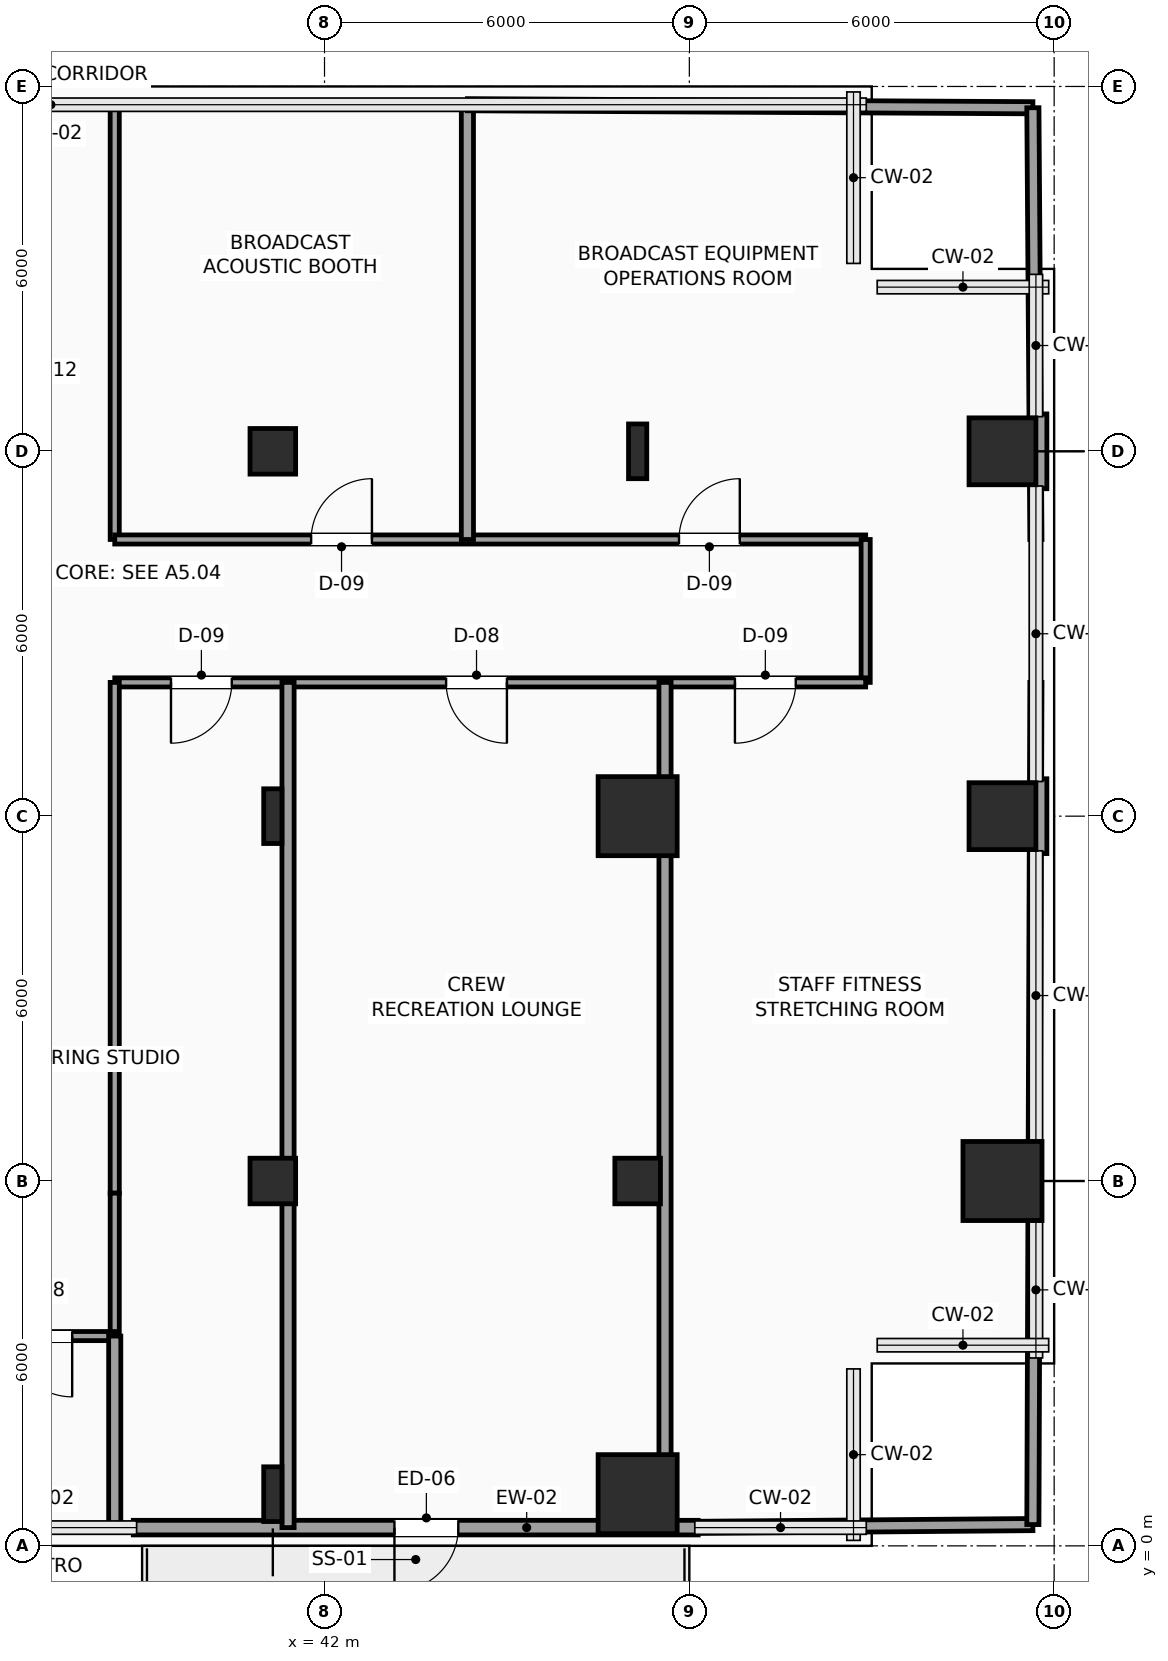
"""IFC4 building model, lengths in metres.
Left out: names, types, materials, properties, quantities, classifications, styles, units other than length and angle.
Written with IfcOpenShell. Run it as: python <this file> out.ifc"""

import sys

from ifc_helpers import new_model, si_unit, direction, frame, frame_2d, origin, origin_2d, place, context, subcontext, project, spatial, rectangle, hollow_rectangle, i_section, extrude, element, fill, save


model = new_model("IFC4")
c1 = context("Model", 3, precision=1e-05, world=origin(), true_north=direction((0.0, 1.0)))
c2 = subcontext(c1, "Body", "Model", "MODEL_VIEW")
j1 = project(units=[si_unit("LENGTHUNIT", "METRE"), si_unit("PLANEANGLEUNIT", "RADIAN")], contexts=[c1])
p1 = place(None, origin())
s1 = spatial("IfcSite", under=j1, at=p1, CompositionType="ELEMENT")
p2 = place(p1, origin())
s2 = spatial("IfcBuilding", under=s1, at=p2, CompositionType="ELEMENT")
p3 = place(p2, frame((0.0, 0.0, 71.4)))
s3 = spatial("IfcBuildingStorey", under=s2, at=p3, CompositionType="ELEMENT", Elevation=71.4)
p4 = place(p3, frame((41.15, 0.85, 0.0), z_axis=(0.0, 0.0, 1.0), x_axis=(1.0, 0.0, 0.0)))
e1 = element("IfcColumn", 1, at=p4, inside=s3, PredefinedType="COLUMN", context=c2, shape_type="SweptSolid", body=[
    extrude(i_section(OverallWidth=0.3, OverallDepth=0.9, WebThickness=0.019, FlangeThickness=0.035, FilletRadius=0.03, at=origin_2d()), origin(), (0.0, 0.0, 1.0), 3.9),
])
p5 = place(p3, frame((41.15, 6.0, 0.0), z_axis=(0.0, 0.0, 1.0), x_axis=(1.0, 0.0, 0.0)))
e2 = element("IfcColumn", 2, at=p5, inside=s3, PredefinedType="COLUMN", context=c2, shape_type="SweptSolid", body=[
    extrude(hollow_rectangle(XDim=0.75, YDim=0.75, WallThickness=0.035, InnerFilletRadius=0.035, OuterFilletRadius=0.05, at=origin_2d()), origin(), (0.0, 0.0, 1.0), 3.9),
])
p6 = place(p3, frame((41.15, 12.0, 0.0), z_axis=(0.0, 0.0, 1.0), x_axis=(1.0, 0.0, 0.0)))
e3 = element("IfcColumn", 3, at=p6, inside=s3, PredefinedType="COLUMN", context=c2, shape_type="SweptSolid", body=[
    extrude(i_section(OverallWidth=0.3, OverallDepth=0.9, WebThickness=0.019, FlangeThickness=0.035, FilletRadius=0.03, at=origin_2d()), origin(), (0.0, 0.0, 1.0), 3.9),
])
p7 = place(p3, frame((41.15, 18.0, 0.0), z_axis=(0.0, 0.0, 1.0), x_axis=(1.0, 0.0, 0.0)))
e4 = element("IfcColumn", 4, at=p7, inside=s3, PredefinedType="COLUMN", context=c2, shape_type="SweptSolid", body=[
    extrude(hollow_rectangle(XDim=0.75, YDim=0.75, WallThickness=0.035, InnerFilletRadius=0.035, OuterFilletRadius=0.05, at=origin_2d()), origin(), (0.0, 0.0, 1.0), 3.9),
])
p8 = place(p3, frame((47.15, 0.85, 0.0), z_axis=(0.0, 0.0, 1.0), x_axis=(1.0, 0.0, 0.0)))
e5 = element("IfcColumn", 5, at=p8, inside=s3, PredefinedType="COLUMN", context=c2, shape_type="SweptSolid", body=[
    extrude(rectangle(XDim=1.3, YDim=1.3, at=origin_2d()), origin(), (0.0, 0.0, 1.0), 3.9),
])
p9 = place(p3, frame((47.15, 6.0, 0.0), z_axis=(0.0, 0.0, 1.0), x_axis=(1.0, 0.0, 0.0)))
e6 = element("IfcColumn", 6, at=p9, inside=s3, PredefinedType="COLUMN", context=c2, shape_type="SweptSolid", body=[
    extrude(hollow_rectangle(XDim=0.75, YDim=0.75, WallThickness=0.035, InnerFilletRadius=0.035, OuterFilletRadius=0.05, at=origin_2d()), origin(), (0.0, 0.0, 1.0), 3.9),
])
p10 = place(p3, frame((47.15, 12.0, 0.0), z_axis=(0.0, 0.0, 1.0), x_axis=(1.0, 0.0, 0.0)))
e7 = element("IfcColumn", 7, at=p10, inside=s3, PredefinedType="COLUMN", context=c2, shape_type="SweptSolid", body=[
    extrude(rectangle(XDim=1.3, YDim=1.3, at=origin_2d()), origin(), (0.0, 0.0, 1.0), 3.9),
])
p11 = place(p3, frame((47.15, 18.0, 0.0), z_axis=(0.0, 0.0, 1.0), x_axis=(1.0, 0.0, 0.0)))
e8 = element("IfcColumn", 8, at=p11, inside=s3, PredefinedType="COLUMN", context=c2, shape_type="SweptSolid", body=[
    extrude(i_section(OverallWidth=0.3, OverallDepth=0.9, WebThickness=0.019, FlangeThickness=0.035, FilletRadius=0.03, at=origin_2d()), origin(), (0.0, 0.0, 1.0), 3.9),
])
p12 = place(p3, frame((53.15, 6.0, 0.0), z_axis=(0.0, 0.0, 1.0), x_axis=(1.0, 0.0, 0.0)))
e9 = element("IfcColumn", 9, at=p12, inside=s3, PredefinedType="COLUMN", context=c2, shape_type="SweptSolid", body=[
    extrude(rectangle(XDim=1.3, YDim=1.3, at=origin_2d()), origin(), (0.0, 0.0, 1.0), 3.9),
])
for number, where, z_axis, x_axis in (
    (10, (53.15, 12.0, 0.0), (0.0, 0.0, 1.0), (1.0, 0.0, 0.0)),
    (11, (53.15, 18.0, 0.0), (0.0, 0.0, 1.0), (1.0, 0.0, 0.0)),
):
    element("IfcColumn", number, at=place(p3, frame(where, z_axis=z_axis, x_axis=x_axis)), inside=s3, PredefinedType="COLUMN", context=c2, shape_type="SweptSolid", body=[
        extrude(rectangle(XDim=1.1, YDim=1.1, at=origin_2d()), origin(), (0.0, 0.0, 1.0), 3.9),
    ])
p13 = place(p3, frame((48.145, 0.3, 0.0), z_axis=(0.0, 0.0, 1.0), x_axis=(-1.0, 0.0, 0.0)))
e12 = element("IfcWall", 12, at=p13, inside=s3, PredefinedType="SOLIDWALL", context=c2, shape_type="SweptSolid", body=[
    extrude(rectangle(XDim=9.29, YDim=0.24, at=frame_2d((4.645, 0.0))), origin(), (0.0, 0.0, 1.0), 3.65),
])
p14 = place(p13, frame((3.945, 0.0, 0.0)))
e13 = element("IfcOpeningElement", 13, at=p14, cuts=e12, PredefinedType="OPENING", context=c2, shape_type="SweptSolid", body=[
    extrude(rectangle(XDim=1.05, YDim=2.2, at=frame_2d((0.525, 1.1))), frame((0.0, 0.13, 0.0), z_axis=(0.0, -1.0, 0.0), x_axis=(1.0, 0.0, 0.0)), (0.0, 0.0, 1.0), 0.26),
])
for number, where, z_axis, x_axis in (
    (14, (53.76, 18.615, 0.0), (0.0, 0.0, 1.0), (0.0, -1.0, 0.0)),
    (15, (53.76, 12.615, 0.0), (0.0, 0.0, 1.0), (0.0, -1.0, 0.0)),
):
    element("IfcWall", number, at=place(p3, frame(where, z_axis=z_axis, x_axis=x_axis)), inside=s3, PredefinedType="SOLIDWALL", context=c2, shape_type="SweptSolid", body=[
        extrude(rectangle(XDim=1.23, YDim=0.24, at=frame_2d((0.615, 0.0))), origin(), (0.0, 0.0, 1.0), 3.65),
    ])
p15 = place(p3, frame((38.55, 23.7, 0.0), z_axis=(0.0, 0.0, 1.0), x_axis=(0.0, -1.0, 0.0)))
e16 = element("IfcWall", 16, at=p15, inside=s3, PredefinedType="PARTITIONING", context=c2, shape_type="SweptSolid", body=[
    extrude(rectangle(XDim=7.15, YDim=0.15, at=frame_2d((3.575, 0.0))), origin(), (0.0, 0.0, 1.0), 3.65),
])
p16 = place(p3, frame((38.55, 16.55, 0.0), z_axis=(0.0, 0.0, 1.0), x_axis=(1.0, 0.0, 0.0)))
e17 = element("IfcWall", 17, at=p16, inside=s3, PredefinedType="PARTITIONING", context=c2, shape_type="SweptSolid", body=[
    extrude(rectangle(XDim=12.35, YDim=0.15, at=frame_2d((6.175, 0.0))), origin(), (0.0, 0.0, 1.0), 3.65),
])
p17 = place(p16, frame((3.23, 0.0, 0.0)))
e18 = element("IfcOpeningElement", 18, at=p17, cuts=e17, PredefinedType="OPENING", context=c2, shape_type="SweptSolid", body=[
    extrude(rectangle(XDim=1.0, YDim=2.2, at=frame_2d((0.5, 1.1))), frame((0.0, 0.085, 0.0), z_axis=(0.0, -1.0, 0.0), x_axis=(1.0, 0.0, 0.0)), (0.0, 0.0, 1.0), 0.17),
])
p18 = place(p16, frame((9.28, 0.0, 0.0)))
e19 = element("IfcOpeningElement", 19, at=p18, cuts=e17, PredefinedType="OPENING", context=c2, shape_type="SweptSolid", body=[
    extrude(rectangle(XDim=1.0, YDim=2.2, at=frame_2d((0.5, 1.1))), frame((0.0, 0.085, 0.0), z_axis=(0.0, -1.0, 0.0), x_axis=(1.0, 0.0, 0.0)), (0.0, 0.0, 1.0), 0.17),
])
p19 = place(p3, frame((50.9, 16.55, 0.0), z_axis=(0.0, 0.0, 1.0), x_axis=(0.0, -1.0, 0.0)))
e20 = element("IfcWall", 20, at=p19, inside=s3, PredefinedType="PARTITIONING", context=c2, shape_type="SweptSolid", body=[
    extrude(rectangle(XDim=2.35, YDim=0.15, at=frame_2d((1.175, 0.0))), origin(), (0.0, 0.0, 1.0), 3.65),
])
p20 = place(p3, frame((50.9, 14.2, 0.0), z_axis=(0.0, 0.0, 1.0), x_axis=(-1.0, 0.0, 0.0)))
e21 = element("IfcWall", 21, at=p20, inside=s3, PredefinedType="PARTITIONING", context=c2, shape_type="SweptSolid", body=[
    extrude(rectangle(XDim=12.35, YDim=0.15, at=frame_2d((6.175, 0.0))), origin(), (0.0, 0.0, 1.0), 3.65),
])
p21 = place(p20, frame((10.425, 0.0, 0.0)))
e22 = element("IfcOpeningElement", 22, at=p21, cuts=e21, PredefinedType="OPENING", context=c2, shape_type="SweptSolid", body=[
    extrude(rectangle(XDim=1.0, YDim=2.2, at=frame_2d((0.5, 1.1))), frame((0.0, 0.085, 0.0), z_axis=(0.0, -1.0, 0.0), x_axis=(1.0, 0.0, 0.0)), (0.0, 0.0, 1.0), 0.17),
])
p22 = place(p20, frame((5.9, 0.0, 0.0)))
e23 = element("IfcOpeningElement", 23, at=p22, cuts=e21, PredefinedType="OPENING", context=c2, shape_type="SweptSolid", body=[
    extrude(rectangle(XDim=1.0, YDim=2.2, at=frame_2d((0.5, 1.1))), frame((0.0, 0.085, 0.0), z_axis=(0.0, -1.0, 0.0), x_axis=(1.0, 0.0, 0.0)), (0.0, 0.0, 1.0), 0.17),
])
p23 = place(p20, frame((1.15, 0.0, 0.0)))
e24 = element("IfcOpeningElement", 24, at=p23, cuts=e21, PredefinedType="OPENING", context=c2, shape_type="SweptSolid", body=[
    extrude(rectangle(XDim=1.0, YDim=2.2, at=frame_2d((0.5, 1.1))), frame((0.0, 0.085, 0.0), z_axis=(0.0, -1.0, 0.0), x_axis=(1.0, 0.0, 0.0)), (0.0, 0.0, 1.0), 0.17),
])
p24 = place(p3, frame((38.55, 14.2, 0.0), z_axis=(0.0, 0.0, 1.0), x_axis=(0.0, -1.0, 0.0)))
e25 = element("IfcWall", 25, at=p24, inside=s3, PredefinedType="PARTITIONING", context=c2, shape_type="SweptSolid", body=[
    extrude(rectangle(XDim=8.4, YDim=0.15, at=frame_2d((4.2, 0.0))), origin(), (0.0, 0.0, 1.0), 3.65),
])
p25 = place(p3, frame((38.55, 5.8, 0.0), z_axis=(0.0, 0.0, 1.0), x_axis=(0.0, -1.0, 0.0)))
e26 = element("IfcWall", 26, at=p25, inside=s3, PredefinedType="PARTITIONING", context=c2, shape_type="SweptSolid", body=[
    extrude(rectangle(XDim=2.35, YDim=0.15, at=frame_2d((1.175, 0.0))), origin(), (0.0, 0.0, 1.0), 3.65),
])
p26 = place(p3, frame((38.55, 3.45, 0.0), z_axis=(0.0, 0.0, 1.0), x_axis=(-1.0, 0.0, 0.0)))
e27 = element("IfcWall", 27, at=p26, inside=s3, PredefinedType="PARTITIONING", context=c2, shape_type="SweptSolid", body=[
    extrude(rectangle(XDim=2.4, YDim=0.15, at=frame_2d((1.2, 0.0))), origin(), (0.0, 0.0, 1.0), 3.142),
])
p27 = place(p26, frame((0.7, 0.0, 0.0)))
e28 = element("IfcOpeningElement", 28, at=p27, cuts=e27, PredefinedType="OPENING", context=c2, shape_type="SweptSolid", body=[
    extrude(rectangle(XDim=1.0, YDim=2.2, at=frame_2d((0.5, 1.1))), frame((0.0, 0.085, 0.0), z_axis=(0.0, -1.0, 0.0), x_axis=(1.0, 0.0, 0.0)), (0.0, 0.0, 1.0), 0.17),
])
p28 = place(p3, frame((41.4, 0.3, 0.0), z_axis=(0.0, 0.0, 1.0), x_axis=(0.0, 1.0, 0.0)))
e29 = element("IfcWall", 29, at=p28, inside=s3, PredefinedType="PARTITIONING", context=c2, shape_type="SweptSolid", body=[
    extrude(rectangle(XDim=13.9, YDim=0.2, at=frame_2d((6.95, 0.0))), origin(), (0.0, 0.0, 1.0), 2.992),
])
p29 = place(p3, frame((47.6, 0.3, 0.0), z_axis=(0.0, 0.0, 1.0), x_axis=(0.0, 1.0, 0.0)))
e30 = element("IfcWall", 30, at=p29, inside=s3, PredefinedType="PARTITIONING", context=c2, shape_type="SweptSolid", body=[
    extrude(rectangle(XDim=13.9, YDim=0.2, at=frame_2d((6.95, 0.0))), origin(), (0.0, 0.0, 1.0), 3.65),
])
p30 = place(p3, frame((48.145, 0.304, 0.0), z_axis=(0.0, 0.0, 1.0), x_axis=(0.999965611379, 0.008293133286, 0.0)))
e31 = element("IfcWall", 31, at=p30, inside=s3, PredefinedType="PARTITIONING", context=c2, shape_type="SweptSolid", body=[
    extrude(rectangle(XDim=5.505, YDim=0.2, at=frame_2d((2.752, 0.0))), origin(), (0.0, 0.0, 1.0), 3.65),
])
p31 = place(p3, frame((53.65, 0.35, 0.0), z_axis=(0.0, 0.0, 1.0), x_axis=(0.003606251025, 0.999993497456, 0.0)))
e32 = element("IfcWall", 32, at=p31, inside=s3, PredefinedType="PARTITIONING", context=c2, shape_type="SweptSolid", body=[
    extrude(rectangle(XDim=11.035, YDim=0.2, at=frame_2d((5.518, 0.0))), origin(), (0.0, 0.0, 1.0), 3.65),
])
p32 = place(p3, frame((53.694, 12.615, 0.0), z_axis=(0.0, 0.0, 1.0), x_axis=(0.003542799701, 0.999993724265, 0.0)))
e33 = element("IfcWall", 33, at=p32, inside=s3, PredefinedType="PARTITIONING", context=c2, shape_type="SweptSolid", body=[
    extrude(rectangle(XDim=1.585, YDim=0.2, at=frame_2d((0.792, 0.0))), origin(), (0.0, 0.0, 1.0), 3.65),
])
p33 = place(p3, frame((44.35, 16.55, 0.0), z_axis=(0.0, 0.0, 1.0), x_axis=(0.0, 1.0, 0.0)))
e34 = element("IfcWall", 34, at=p33, inside=s3, PredefinedType="PARTITIONING", context=c2, shape_type="SweptSolid", body=[
    extrude(rectangle(XDim=7.15, YDim=0.2, at=frame_2d((3.575, 0.0))), origin(), (0.0, 0.0, 1.0), 3.65),
])
p34 = place(p3, frame((44.35, 23.7, 0.0), z_axis=(0.0, 0.0, 1.0), x_axis=(0.999985518927, -0.005381629512, 0.0)))
e35 = element("IfcWall", 35, at=p34, inside=s3, PredefinedType="PARTITIONING", context=c2, shape_type="SweptSolid", body=[
    extrude(rectangle(XDim=9.3, YDim=0.2, at=frame_2d((4.65, 0.0))), origin(), (0.0, 0.0, 1.0), 3.65),
])
p35 = place(p3, frame((53.7, 16.55, 0.0), z_axis=(0.0, 0.0, 1.0), x_axis=(-0.007017371073, 0.999975377948, 0.0)))
e36 = element("IfcWall", 36, at=p35, inside=s3, PredefinedType="PARTITIONING", context=c2, shape_type="SweptSolid", body=[
    extrude(rectangle(XDim=0.835, YDim=0.2, at=frame_2d((0.417, 0.0))), origin(), (0.0, 0.0, 1.0), 3.65),
])
p36 = place(p3, frame((53.686, 18.615, 0.0), z_axis=(0.0, 0.0, 1.0), x_axis=(-0.007079296972, 0.999974941463, 0.0)))
e37 = element("IfcWall", 37, at=p36, inside=s3, PredefinedType="PARTITIONING", context=c2, shape_type="SweptSolid", body=[
    extrude(rectangle(XDim=5.035, YDim=0.2, at=frame_2d((2.518, 0.0))), origin(), (0.0, 0.0, 1.0), 3.65),
])
p37 = place(p3, frame((38.55, 0.3, 0.0), z_axis=(0.0, 0.0, 1.0), x_axis=(0.0, 1.0, 0.0)))
e38 = element("IfcWall", 38, at=p37, inside=s3, PredefinedType="PARTITIONING", context=c2, shape_type="SweptSolid", body=[
    extrude(rectangle(XDim=3.15, YDim=0.2, at=frame_2d((1.575, 0.0))), origin(), (0.0, 0.0, 1.0), 3.65),
])
p38 = place(p14, origin())
e39 = element("IfcDoor", 39, at=p38, inside=s3, OperationType="SINGLE_SWING_RIGHT", PredefinedType="DOOR", context=c2, shape_type="SweptSolid", body=[
    extrude(rectangle(XDim=1.05, YDim=2.2, at=frame_2d((0.525, 1.1))), frame((0.0, 0.025, 0.0), z_axis=(0.0, -1.0, 0.0), x_axis=(1.0, 0.0, 0.0)), (0.0, 0.0, 1.0), 0.05),
])
fill(e13, e39)
p39 = place(p17, origin())
e40 = element("IfcDoor", 40, at=p39, inside=s3, OperationType="SINGLE_SWING_RIGHT", PredefinedType="DOOR", context=c2, shape_type="SweptSolid", body=[
    extrude(rectangle(XDim=1.0, YDim=2.2, at=frame_2d((0.5, 1.1))), frame((0.0, 0.025, 0.0), z_axis=(0.0, -1.0, 0.0), x_axis=(1.0, 0.0, 0.0)), (0.0, 0.0, 1.0), 0.05),
])
fill(e18, e40)
p40 = place(p18, origin())
e41 = element("IfcDoor", 41, at=p40, inside=s3, OperationType="SINGLE_SWING_RIGHT", PredefinedType="DOOR", context=c2, shape_type="SweptSolid", body=[
    extrude(rectangle(XDim=1.0, YDim=2.2, at=frame_2d((0.5, 1.1))), frame((0.0, 0.025, 0.0), z_axis=(0.0, -1.0, 0.0), x_axis=(1.0, 0.0, 0.0)), (0.0, 0.0, 1.0), 0.05),
])
fill(e19, e41)
p41 = place(p21, origin())
e42 = element("IfcDoor", 42, at=p41, inside=s3, OperationType="SINGLE_SWING_RIGHT", PredefinedType="DOOR", context=c2, shape_type="SweptSolid", body=[
    extrude(rectangle(XDim=1.0, YDim=2.2, at=frame_2d((0.5, 1.1))), frame((0.0, 0.025, 0.0), z_axis=(0.0, -1.0, 0.0), x_axis=(1.0, 0.0, 0.0)), (0.0, 0.0, 1.0), 0.05),
])
fill(e22, e42)
p42 = place(p22, origin())
e43 = element("IfcDoor", 43, at=p42, inside=s3, OperationType="SINGLE_SWING_LEFT", PredefinedType="DOOR", context=c2, shape_type="SweptSolid", body=[
    extrude(rectangle(XDim=1.0, YDim=2.2, at=frame_2d((0.5, 1.1))), frame((0.0, 0.025, 0.0), z_axis=(0.0, -1.0, 0.0), x_axis=(1.0, 0.0, 0.0)), (0.0, 0.0, 1.0), 0.05),
])
fill(e23, e43)
p43 = place(p23, origin())
e44 = element("IfcDoor", 44, at=p43, inside=s3, OperationType="SINGLE_SWING_RIGHT", PredefinedType="DOOR", context=c2, shape_type="SweptSolid", body=[
    extrude(rectangle(XDim=1.0, YDim=2.2, at=frame_2d((0.5, 1.1))), frame((0.0, 0.025, 0.0), z_axis=(0.0, -1.0, 0.0), x_axis=(1.0, 0.0, 0.0)), (0.0, 0.0, 1.0), 0.05),
])
fill(e24, e44)
p44 = place(p27, origin())
e45 = element("IfcDoor", 45, at=p44, inside=s3, OperationType="SINGLE_SWING_LEFT", PredefinedType="DOOR", context=c2, shape_type="SweptSolid", body=[
    extrude(rectangle(XDim=1.0, YDim=2.2, at=frame_2d((0.5, 1.1))), frame((0.0, 0.025, 0.0), z_axis=(0.0, -1.0, 0.0), x_axis=(1.0, 0.0, 0.0)), (0.0, 0.0, 1.0), 0.05),
])
fill(e28, e45)
save(model, sys.argv[1])
